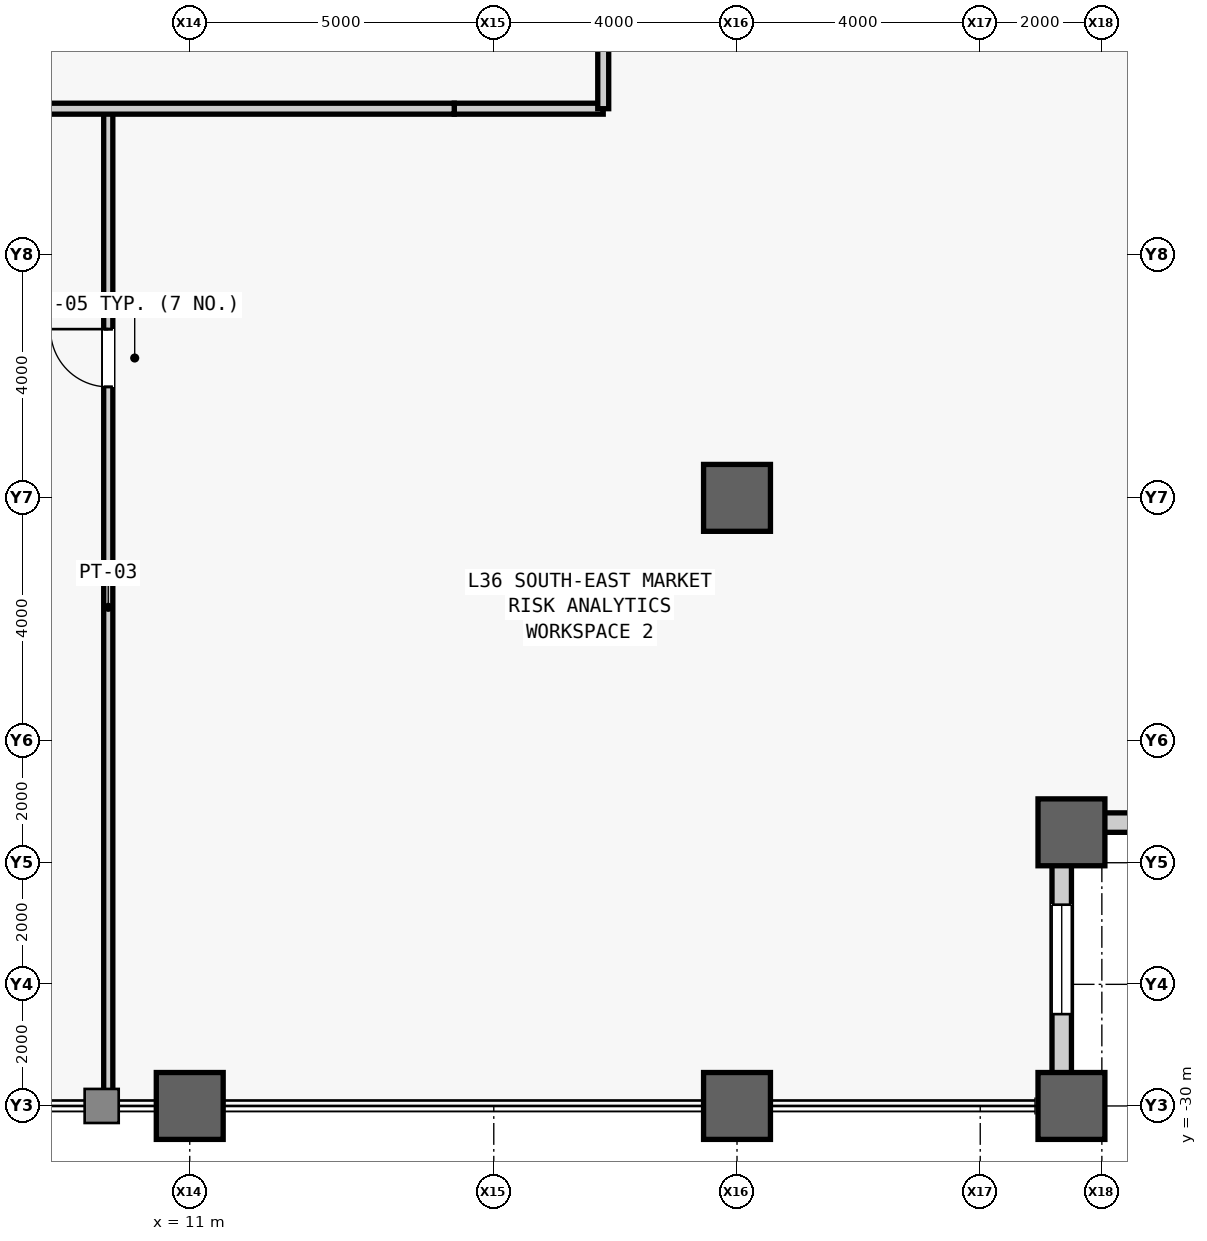
"""IFC4 building model, lengths in metres.
Left out: names, types, materials, properties, quantities, classifications, styles, units other than length and angle.
Written with IfcOpenShell. Run it as: python <this file> out.ifc"""

import sys

from ifc_helpers import new_model, si_unit, direction, frame, frame_2d, origin, origin_2d, place, context, subcontext, project, spatial, rectangle, hollow_rectangle, extrude, source, transform, mapped, element, fill, save


model = new_model("IFC4")
c1 = context("Model", 3, precision=1e-05, world=origin(), true_north=direction((0.0, 1.0)))
c2 = subcontext(c1, "Body", "Model", "MODEL_VIEW")
j1 = project(units=[si_unit("LENGTHUNIT", "METRE"), si_unit("PLANEANGLEUNIT", "RADIAN")], contexts=[c1])
p1 = place(None, origin())
s1 = spatial("IfcSite", under=j1, at=p1, CompositionType="ELEMENT")
p2 = place(p1, origin())
s2 = spatial("IfcBuilding", under=s1, at=p2, CompositionType="ELEMENT")
p3 = place(p2, frame((0.0, 0.0, 159.1)))
s3 = spatial("IfcBuildingStorey", under=s2, at=p3, CompositionType="ELEMENT", Elevation=159.1)
m1 = source(origin(), c2, "Body", "SweptSolid", [
    extrude(hollow_rectangle(XDim=1.1, YDim=1.1, WallThickness=0.06, at=origin_2d()), origin(), (0.0, 0.0, 1.0), 4.0),
])
for number, where, z_axis, x_axis in (
    (1, (11.0, -30.0, 0.0), (0.0, 0.0, 1.0), (1.0, 0.0, 0.0)),
    (2, (20.0, -30.0, 0.0), (0.0, 0.0, 1.0), (1.0, 0.0, 0.0)),
    (3, (20.0, -20.0, 0.0), (0.0, 0.0, 1.0), (1.0, 0.0, 0.0)),
    (4, (25.5, -30.0, 0.0), (0.0, 0.0, 1.0), (1.0, 0.0, 0.0)),
    (5, (25.5, -25.5, 0.0), (0.0, 0.0, 1.0), (1.0, 0.0, 0.0)),
):
    element("IfcColumn", number, at=place(p3, frame(where, z_axis=z_axis, x_axis=x_axis)), inside=s3, PredefinedType="COLUMN", context=c2, shape_type="MappedRepresentation", body=[
        mapped(m1, transform((0.0, 0.0, 0.0), scale=1.0)),
    ])
m2 = source(origin(), c2, "Body", "SweptSolid", [
    extrude(rectangle(XDim=4.18, YDim=0.32, at=frame_2d((2.09, 0.0))), origin(), (0.0, 0.0, 1.0), 3.164),
])
p4 = place(p3, frame((25.34, -29.68, 0.0), z_axis=(0.0, 0.0, 1.0), x_axis=(0.0, 1.0, 0.0)))
e6 = element("IfcWall", 6, at=p4, inside=s3, PredefinedType="STANDARD", context=c2, shape_type="MappedRepresentation", body=[
    mapped(m2, transform((0.0, 0.0, 0.0), scale=1.0)),
])
m3 = source(origin(), c2, "Body", "SweptSolid", [
    extrude(rectangle(XDim=1.8, YDim=2.4, at=frame_2d((0.9, 1.2))), frame((0.0, 0.17, 0.0), z_axis=(0.0, -1.0, 0.0), x_axis=(1.0, 0.0, 0.0)), (0.0, 0.0, 1.0), 0.34),
])
p5 = place(p4, frame((1.19, 0.0, 0.5)))
e7 = element("IfcOpeningElement", 7, at=p5, cuts=e6, PredefinedType="OPENING", context=c2, shape_type="MappedRepresentation", body=[
    mapped(m3, transform((0.0, 0.0, 0.0), scale=1.0)),
])
p6 = place(p3, frame((25.5, -25.34, 0.0), z_axis=(0.0, 0.0, 1.0), x_axis=(1.0, 0.0, 0.0)))
e8 = element("IfcWall", 8, at=p6, inside=s3, PredefinedType="STANDARD", context=c2, shape_type="MappedRepresentation", body=[
    mapped(m2, transform((0.0, 0.0, 0.0), scale=1.0)),
])
p7 = place(p6, frame((1.19, 0.0, 0.5)))
e9 = element("IfcOpeningElement", 9, at=p7, cuts=e8, PredefinedType="OPENING", context=c2, shape_type="MappedRepresentation", body=[
    mapped(m3, transform((0.0, 0.0, 0.0), scale=1.0)),
])
m4 = source(origin(), c2, "Body", "SweptSolid", [
    extrude(rectangle(XDim=2.45, YDim=0.18, at=frame_2d((1.225, 0.0))), origin(), (0.0, 0.0, 1.0), 3.78),
])
p8 = place(p3, frame((15.35, -13.6, 0.0), z_axis=(0.0, 0.0, 1.0), x_axis=(1.0, 0.0, 0.0)))
e10 = element("IfcWall", 10, at=p8, inside=s3, PredefinedType="PARTITIONING", context=c2, shape_type="MappedRepresentation", body=[
    mapped(m4, transform((0.0, 0.0, 0.0), scale=1.0)),
])
m5 = source(origin(), c2, "Body", "SweptSolid", [
    extrude(rectangle(XDim=16.4, YDim=0.15, at=frame_2d((8.2, 0.0))), origin(), (0.0, 0.0, 1.0), 3.78),
])
p9 = place(p3, frame((9.66, -30.0, 0.0), z_axis=(0.0, 0.0, 1.0), x_axis=(0.0, 1.0, 0.0)))
e11 = element("IfcWall", 11, at=p9, inside=s3, PredefinedType="PARTITIONING", context=c2, shape_type="MappedRepresentation", body=[
    mapped(m5, transform((0.0, 0.0, 0.0), scale=1.0)),
])
m6 = source(origin(), c2, "Body", "SweptSolid", [
    extrude(rectangle(XDim=0.95, YDim=2.15, at=frame_2d((0.475, 1.075))), frame((0.0, 0.085, 0.0), z_axis=(0.0, -1.0, 0.0), x_axis=(1.0, 0.0, 0.0)), (0.0, 0.0, 1.0), 0.17),
])
p10 = place(p9, frame((11.825, 0.0, 0.0)))
e12 = element("IfcOpeningElement", 12, at=p10, cuts=e11, PredefinedType="OPENING", context=c2, shape_type="MappedRepresentation", body=[
    mapped(m6, transform((0.0, 0.0, 0.0), scale=1.0)),
])
m7 = source(origin(), c2, "Body", "SweptSolid", [
    extrude(rectangle(XDim=18.65, YDim=0.18, at=frame_2d((9.325, 0.0))), origin(), (0.0, 0.0, 1.0), 3.78),
])
p11 = place(p3, frame((-3.3, -13.6, 0.0), z_axis=(0.0, 0.0, 1.0), x_axis=(1.0, 0.0, 0.0)))
e13 = element("IfcWall", 13, at=p11, inside=s3, PredefinedType="PARTITIONING", context=c2, shape_type="MappedRepresentation", body=[
    mapped(m7, transform((0.0, 0.0, 0.0), scale=1.0)),
])
m8 = source(origin(), c2, "Body", "SweptSolid", [
    extrude(rectangle(XDim=19.4, YDim=0.18, at=frame_2d((9.7, 0.0))), origin(), (0.0, 0.0, 1.0), 3.78),
])
p12 = place(p3, frame((17.8, -13.6, 0.0), z_axis=(0.0, 0.0, 1.0), x_axis=(0.0, 1.0, 0.0)))
e14 = element("IfcWall", 14, at=p12, inside=s3, PredefinedType="PARTITIONING", context=c2, shape_type="MappedRepresentation", body=[
    mapped(m8, transform((0.0, 0.0, 0.0), scale=1.0)),
])
m9 = source(origin(), c2, "Body", "SweptSolid", [
    extrude(rectangle(XDim=1.8, YDim=2.4, at=frame_2d((0.9, 1.2))), frame((0.0, 0.03, 0.0), z_axis=(0.0, -1.0, 0.0), x_axis=(1.0, 0.0, 0.0)), (0.0, 0.0, 1.0), 0.06),
])
p13 = place(p5, origin())
e15 = element("IfcWindow", 15, at=p13, inside=s3, PartitioningType="SINGLE_PANEL", PredefinedType="WINDOW", context=c2, shape_type="MappedRepresentation", body=[
    mapped(m9, transform((0.0, 0.0, 0.0), scale=1.0)),
])
fill(e7, e15)
m10 = source(origin(), c2, "Body", "SweptSolid", [
    extrude(rectangle(XDim=0.95, YDim=2.15, at=frame_2d((0.475, 1.075))), frame((0.0, 0.025, 0.0), z_axis=(0.0, -1.0, 0.0), x_axis=(1.0, 0.0, 0.0)), (0.0, 0.0, 1.0), 0.05),
])
p14 = place(p10, origin())
e16 = element("IfcDoor", 16, at=p14, inside=s3, OperationType="SINGLE_SWING_RIGHT", PredefinedType="DOOR", context=c2, shape_type="MappedRepresentation", body=[
    mapped(m10, transform((0.0, 0.0, 0.0), scale=1.0)),
])
fill(e12, e16)
save(model, sys.argv[1])
